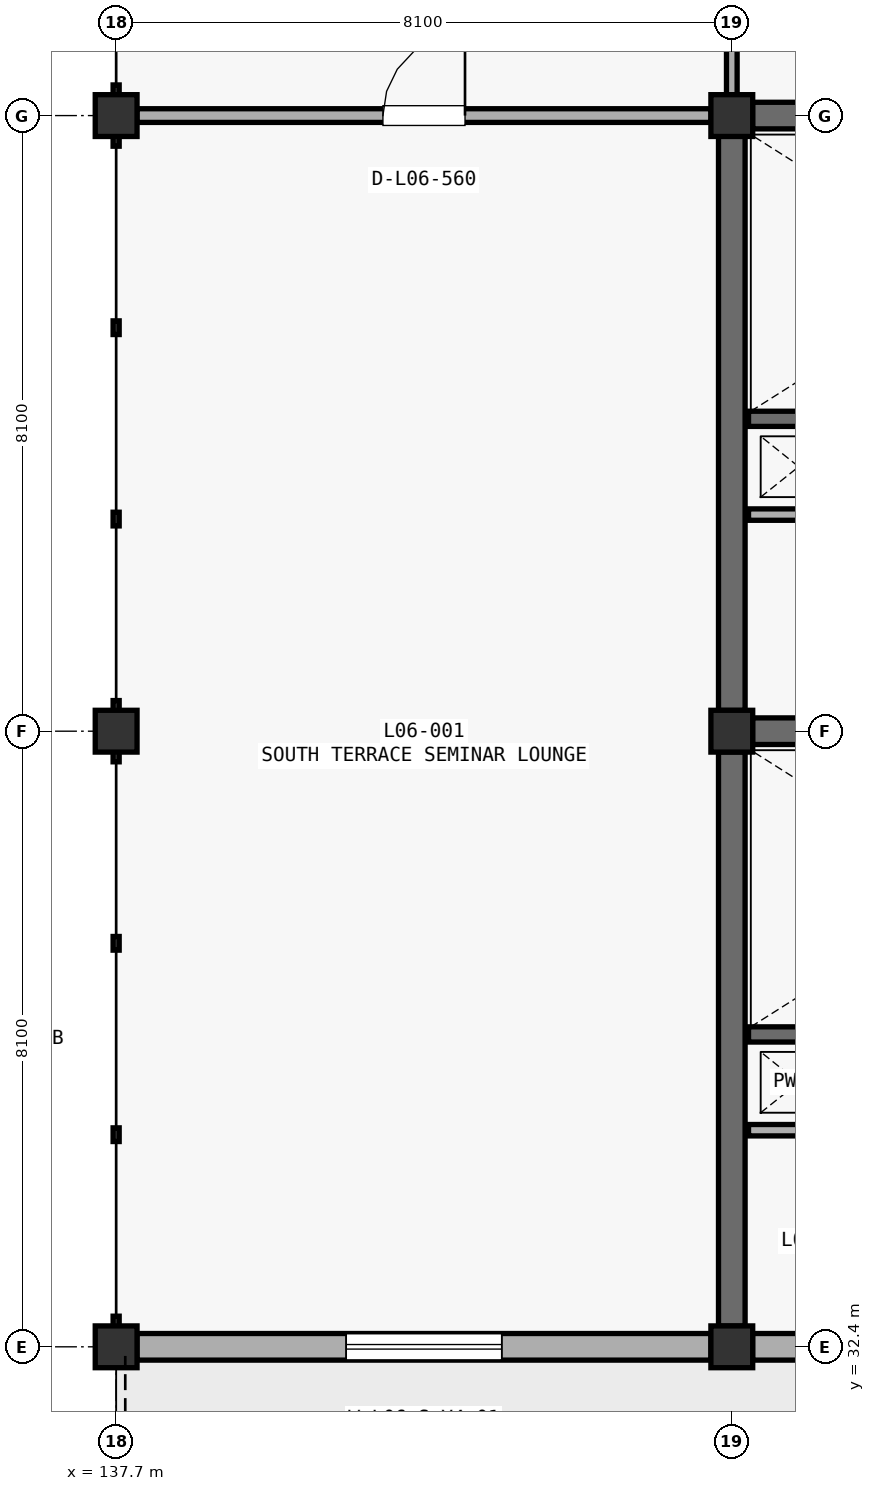
"""IFC4 building model, lengths in metres.
Left out: names, types, materials, properties, quantities, classifications, styles, units other than length and angle.
Written with IfcOpenShell. Run it as: python <this file> out.ifc"""

import sys

from ifc_helpers import new_model, si_unit, direction, frame, frame_2d, origin, origin_2d, place, context, subcontext, project, spatial, rectangle, extrude, element, fill, save


model = new_model("IFC4")
c1 = context("Model", 3, precision=1e-05, world=origin(), true_north=direction((0.0, 1.0)))
c2 = subcontext(c1, "Body", "Model", "MODEL_VIEW")
j1 = project(units=[si_unit("LENGTHUNIT", "METRE"), si_unit("PLANEANGLEUNIT", "RADIAN")], contexts=[c1])
p1 = place(None, origin())
s1 = spatial("IfcSite", under=j1, at=p1, CompositionType="ELEMENT")
p2 = place(p1, origin())
s2 = spatial("IfcBuilding", under=s1, at=p2, CompositionType="ELEMENT")
p3 = place(p2, frame((0.0, 0.0, 27.37)))
s3 = spatial("IfcBuildingStorey", under=s2, at=p3, CompositionType="ELEMENT", Elevation=27.37)
for number, where, z_axis, x_axis in (
    (1, (137.7, 32.4, 0.0), (0.0, 0.0, 1.0), (1.0, 0.0, 0.0)),
    (2, (137.7, 40.5, 0.0), (0.0, 0.0, 1.0), (1.0, 0.0, 0.0)),
    (3, (137.7, 48.6, 0.0), (0.0, 0.0, 1.0), (1.0, 0.0, 0.0)),
    (4, (145.8, 32.4, 0.0), (0.0, 0.0, 1.0), (1.0, 0.0, 0.0)),
    (5, (145.8, 40.5, 0.0), (0.0, 0.0, 1.0), (1.0, 0.0, 0.0)),
    (6, (145.8, 48.6, 0.0), (0.0, 0.0, 1.0), (1.0, 0.0, 0.0)),
):
    element("IfcColumn", number, at=place(p3, frame(where, z_axis=z_axis, x_axis=x_axis)), inside=s3, PredefinedType="COLUMN", context=c2, shape_type="SweptSolid", body=[
        extrude(rectangle(XDim=0.55, YDim=0.55, at=origin_2d()), origin(), (0.0, 0.0, 1.0), 4.42),
    ])
p4 = place(p3, frame((137.973, 32.4, 0.0), z_axis=(0.0, 0.0, 1.0), x_axis=(1.0, 0.0, 0.0)))
e7 = element("IfcWall", 7, at=p4, inside=s3, PredefinedType="STANDARD", context=c2, shape_type="SweptSolid", body=[
    extrude(rectangle(XDim=7.554, YDim=0.35, at=frame_2d((3.777, 0.0))), origin(), (0.0, 0.0, 1.0), 3.512),
])
p5 = place(p4, frame((2.752, 0.0, 0.85)))
e8 = element("IfcOpeningElement", 8, at=p5, cuts=e7, PredefinedType="OPENING", context=c2, shape_type="SweptSolid", body=[
    extrude(rectangle(XDim=2.05, YDim=1.6, at=frame_2d((1.025, 0.8))), frame((0.0, 0.185, 0.0), z_axis=(0.0, -1.0, 0.0), x_axis=(1.0, 0.0, 0.0)), (0.0, 0.0, 1.0), 0.37),
])
p6 = place(p3, frame((146.073, 32.4, 0.0), z_axis=(0.0, 0.0, 1.0), x_axis=(1.0, 0.0, 0.0)))
e9 = element("IfcWall", 9, at=p6, inside=s3, PredefinedType="STANDARD", context=c2, shape_type="SweptSolid", body=[
    extrude(rectangle(XDim=7.554, YDim=0.35, at=frame_2d((3.777, 0.0))), origin(), (0.0, 0.0, 1.0), 3.212),
])
p7 = place(p6, frame((2.627, 0.0, 0.85)))
e10 = element("IfcOpeningElement", 10, at=p7, cuts=e9, PredefinedType="OPENING", context=c2, shape_type="SweptSolid", body=[
    extrude(rectangle(XDim=2.3, YDim=1.6, at=frame_2d((1.15, 0.8))), frame((0.0, 0.185, 0.0), z_axis=(0.0, -1.0, 0.0), x_axis=(1.0, 0.0, 0.0)), (0.0, 0.0, 1.0), 0.37),
])
for number, where, z_axis, x_axis in (
    (11, (146.073, 40.5, 0.0), (0.0, 0.0, 1.0), (1.0, 0.0, 0.0)),
    (12, (145.8, 32.673, 0.0), (0.0, 0.0, 1.0), (0.0, 1.0, 0.0)),
):
    element("IfcWall", number, at=place(p3, frame(where, z_axis=z_axis, x_axis=x_axis)), inside=s3, PredefinedType="SHEAR", context=c2, shape_type="SweptSolid", body=[
        extrude(rectangle(XDim=7.554, YDim=0.35, at=frame_2d((3.777, 0.0))), origin(), (0.0, 0.0, 1.0), 4.162),
    ])
p8 = place(p3, frame((146.02, 36.51, 0.0), z_axis=(0.0, 0.0, 1.0), x_axis=(1.0, 0.0, 0.0)))
e13 = element("IfcWall", 13, at=p8, inside=s3, PredefinedType="SHEAR", context=c2, shape_type="SweptSolid", body=[
    extrude(rectangle(XDim=7.66, YDim=0.2, at=frame_2d((3.83, 0.0))), origin(), (0.0, 0.0, 1.0), 4.162),
])
p9 = place(p8, frame((6.11, 0.0, 0.0)))
e14 = element("IfcOpeningElement", 14, at=p9, cuts=e13, PredefinedType="OPENING", context=c2, shape_type="SweptSolid", body=[
    extrude(rectangle(XDim=1.15, YDim=2.2, at=frame_2d((0.575, 1.1))), frame((0.0, 0.11, 0.0), z_axis=(0.0, -1.0, 0.0), x_axis=(1.0, 0.0, 0.0)), (0.0, 0.0, 1.0), 0.22),
])
p10 = place(p3, frame((146.02, 35.25, 0.0), z_axis=(0.0, 0.0, 1.0), x_axis=(1.0, 0.0, 0.0)))
e15 = element("IfcWall", 15, at=p10, inside=s3, PredefinedType="PARTITIONING", context=c2, shape_type="SweptSolid", body=[
    extrude(rectangle(XDim=2.53, YDim=0.15, at=frame_2d((1.265, 0.0))), origin(), (0.0, 0.0, 1.0), 4.162),
])
for number, where, z_axis, x_axis in (
    (16, (146.073, 48.6, 0.0), (0.0, 0.0, 1.0), (1.0, 0.0, 0.0)),
    (17, (145.8, 40.773, 0.0), (0.0, 0.0, 1.0), (0.0, 1.0, 0.0)),
):
    element("IfcWall", number, at=place(p3, frame(where, z_axis=z_axis, x_axis=x_axis)), inside=s3, PredefinedType="SHEAR", context=c2, shape_type="SweptSolid", body=[
        extrude(rectangle(XDim=7.554, YDim=0.35, at=frame_2d((3.777, 0.0))), origin(), (0.0, 0.0, 1.0), 4.162),
    ])
p11 = place(p3, frame((146.02, 44.61, 0.0), z_axis=(0.0, 0.0, 1.0), x_axis=(1.0, 0.0, 0.0)))
e18 = element("IfcWall", 18, at=p11, inside=s3, PredefinedType="SHEAR", context=c2, shape_type="SweptSolid", body=[
    extrude(rectangle(XDim=7.66, YDim=0.2, at=frame_2d((3.83, 0.0))), origin(), (0.0, 0.0, 1.0), 4.162),
])
p12 = place(p11, frame((6.11, 0.0, 0.0)))
e19 = element("IfcOpeningElement", 19, at=p12, cuts=e18, PredefinedType="OPENING", context=c2, shape_type="SweptSolid", body=[
    extrude(rectangle(XDim=1.15, YDim=2.2, at=frame_2d((0.575, 1.1))), frame((0.0, 0.11, 0.0), z_axis=(0.0, -1.0, 0.0), x_axis=(1.0, 0.0, 0.0)), (0.0, 0.0, 1.0), 0.22),
])
p13 = place(p3, frame((146.02, 43.35, 0.0), z_axis=(0.0, 0.0, 1.0), x_axis=(1.0, 0.0, 0.0)))
e20 = element("IfcWall", 20, at=p13, inside=s3, PredefinedType="PARTITIONING", context=c2, shape_type="SweptSolid", body=[
    extrude(rectangle(XDim=2.53, YDim=0.15, at=frame_2d((1.265, 0.0))), origin(), (0.0, 0.0, 1.0), 4.162),
])
p14 = place(p3, frame((145.8, 48.873, 0.0), z_axis=(0.0, 0.0, 1.0), x_axis=(0.0, 1.0, 0.0)))
e21 = element("IfcWall", 21, at=p14, inside=s3, PredefinedType="PARTITIONING", context=c2, shape_type="SweptSolid", body=[
    extrude(rectangle(XDim=7.554, YDim=0.14, at=frame_2d((3.777, 0.0))), origin(), (0.0, 0.0, 1.0), 3.21),
])
p15 = place(p3, frame((137.973, 48.6, 0.0), z_axis=(0.0, 0.0, 1.0), x_axis=(1.0, 0.0, 0.0)))
e22 = element("IfcWall", 22, at=p15, inside=s3, PredefinedType="PARTITIONING", context=c2, shape_type="SweptSolid", body=[
    extrude(rectangle(XDim=7.554, YDim=0.18, at=frame_2d((3.777, 0.0))), origin(), (0.0, 0.0, 1.0), 3.412),
])
p16 = place(p15, frame((3.237, 0.0, 0.0)))
e23 = element("IfcOpeningElement", 23, at=p16, cuts=e22, PredefinedType="OPENING", context=c2, shape_type="SweptSolid", body=[
    extrude(rectangle(XDim=1.08, YDim=2.15, at=frame_2d((0.54, 1.075))), frame((0.0, 0.1, 0.0), z_axis=(0.0, -1.0, 0.0), x_axis=(1.0, 0.0, 0.0)), (0.0, 0.0, 1.0), 0.2),
])
p17 = place(p5, origin())
e24 = element("IfcWindow", 24, at=p17, inside=s3, PartitioningType="SINGLE_PANEL", PredefinedType="WINDOW", context=c2, shape_type="SweptSolid", body=[
    extrude(rectangle(XDim=2.05, YDim=1.6, at=frame_2d((1.025, 0.8))), frame((0.0, 0.03, 0.0), z_axis=(0.0, -1.0, 0.0), x_axis=(1.0, 0.0, 0.0)), (0.0, 0.0, 1.0), 0.06),
])
fill(e8, e24)
p18 = place(p16, origin())
e25 = element("IfcDoor", 25, at=p18, inside=s3, OperationType="SINGLE_SWING_RIGHT", PredefinedType="DOOR", context=c2, shape_type="SweptSolid", body=[
    extrude(rectangle(XDim=1.08, YDim=2.15, at=frame_2d((0.54, 1.075))), frame((0.0, 0.025, 0.0), z_axis=(0.0, -1.0, 0.0), x_axis=(1.0, 0.0, 0.0)), (0.0, 0.0, 1.0), 0.05),
])
fill(e23, e25)
save(model, sys.argv[1])
